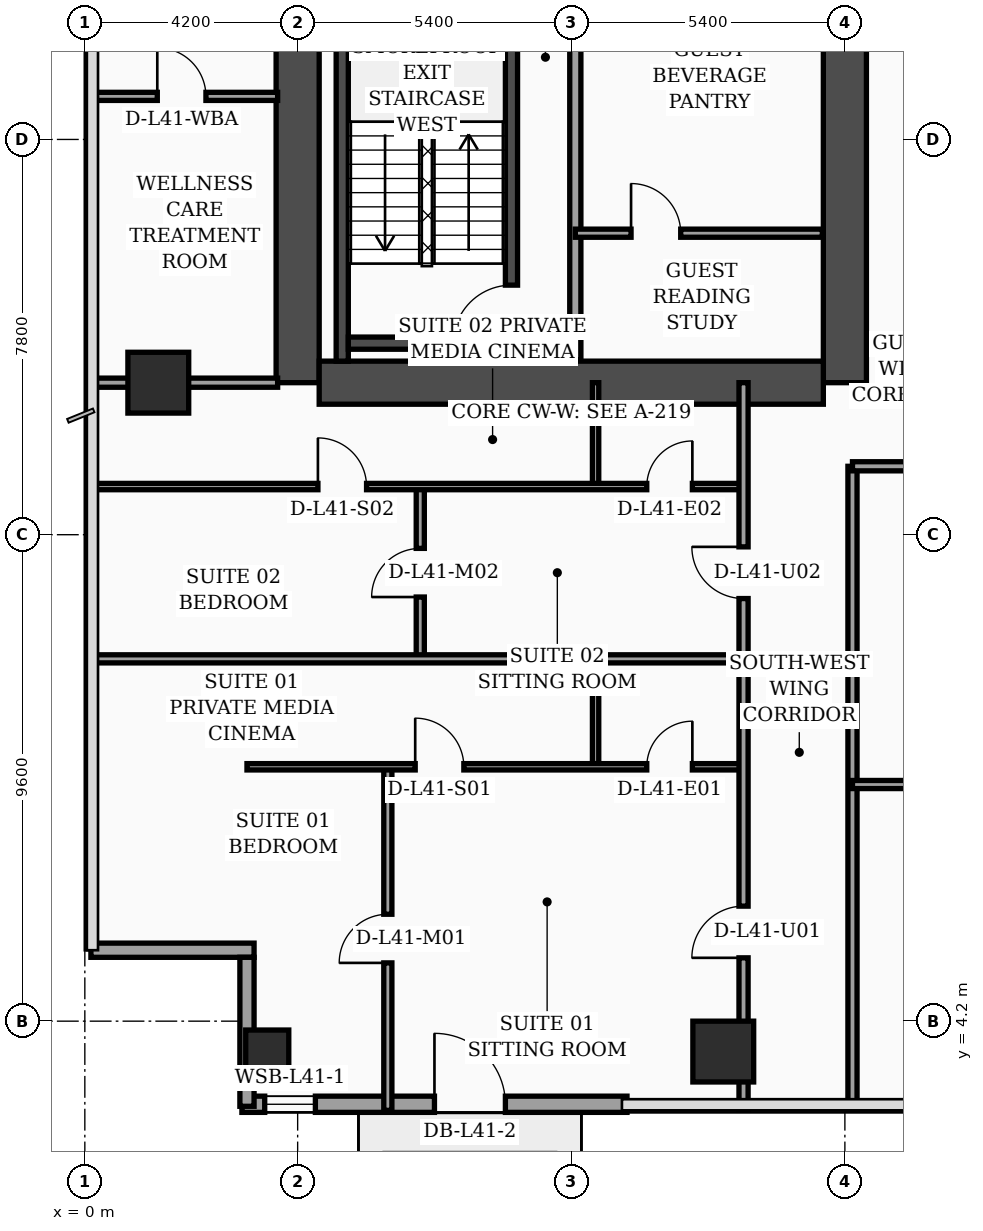
"""IFC4 building model, lengths in metres.
Left out: names, types, materials, properties, quantities, classifications, styles, units other than length and angle.
Written with IfcOpenShell. Run it as: python <this file> out.ifc"""

import sys

from ifc_helpers import new_model, si_unit, direction, frame, frame_2d, origin, origin_2d, place, context, subcontext, project, spatial, rectangle, hollow_rectangle, extrude, element, fill, save


model = new_model("IFC4")
c1 = context("Model", 3, precision=1e-05, world=origin(), true_north=direction((0.0, 1.0)))
c2 = subcontext(c1, "Body", "Model", "MODEL_VIEW")
j1 = project(units=[si_unit("LENGTHUNIT", "METRE"), si_unit("PLANEANGLEUNIT", "RADIAN")], contexts=[c1])
p1 = place(None, origin())
s1 = spatial("IfcSite", under=j1, at=p1, CompositionType="ELEMENT")
p2 = place(p1, origin())
s2 = spatial("IfcBuilding", under=s1, at=p2, CompositionType="ELEMENT")
p3 = place(p2, frame((0.0, 0.0, 167.5)))
s3 = spatial("IfcBuildingStorey", under=s2, at=p3, CompositionType="ELEMENT", Elevation=167.5)
p4 = place(p3, frame((4.2, 16.8, 0.0), z_axis=(0.0, 0.0, 1.0), x_axis=(0.0, 1.0, 0.0)))
e1 = element("IfcWall", 1, at=p4, inside=s3, PredefinedType="SHEAR", context=c2, shape_type="SweptSolid", body=[
    extrude(rectangle(XDim=21.6, YDim=0.85, at=frame_2d((10.8, 0.0))), origin(), (0.0, 0.0, 1.0), 3.56),
])
p5 = place(p3, frame((15.0, 16.8, 0.0), z_axis=(0.0, 0.0, 1.0), x_axis=(0.0, 1.0, 0.0)))
e2 = element("IfcWall", 2, at=p5, inside=s3, PredefinedType="SHEAR", context=c2, shape_type="SweptSolid", body=[
    extrude(rectangle(XDim=21.6, YDim=0.85, at=frame_2d((10.8, 0.0))), origin(), (0.0, 0.0, 1.0), 3.56),
])
p6 = place(p5, frame((8.65, 0.0, 0.0)))
e3 = element("IfcOpeningElement", 3, at=p6, cuts=e2, PredefinedType="OPENING", context=c2, shape_type="SweptSolid", body=[
    extrude(rectangle(XDim=1.1, YDim=2.2, at=frame_2d((0.55, 1.1))), frame((0.0, 0.435, 0.0), z_axis=(0.0, -1.0, 0.0), x_axis=(1.0, 0.0, 0.0)), (0.0, 0.0, 1.0), 0.87),
])
p7 = place(p5, frame((10.85, 0.0, 0.0)))
e4 = element("IfcOpeningElement", 4, at=p7, cuts=e2, PredefinedType="OPENING", context=c2, shape_type="SweptSolid", body=[
    extrude(rectangle(XDim=1.1, YDim=2.2, at=frame_2d((0.55, 1.1))), frame((0.0, 0.435, 0.0), z_axis=(0.0, -1.0, 0.0), x_axis=(1.0, 0.0, 0.0)), (0.0, 0.0, 1.0), 0.87),
])
p8 = place(p5, frame((13.5, 0.0, 0.0)))
e5 = element("IfcOpeningElement", 5, at=p8, cuts=e2, PredefinedType="OPENING", context=c2, shape_type="SweptSolid", body=[
    extrude(rectangle(XDim=1.1, YDim=2.2, at=frame_2d((0.55, 1.1))), frame((0.0, 0.435, 0.0), z_axis=(0.0, -1.0, 0.0), x_axis=(1.0, 0.0, 0.0)), (0.0, 0.0, 1.0), 0.87),
])
p9 = place(p5, frame((16.15, 0.0, 0.0)))
e6 = element("IfcOpeningElement", 6, at=p9, cuts=e2, PredefinedType="OPENING", context=c2, shape_type="SweptSolid", body=[
    extrude(rectangle(XDim=1.1, YDim=2.2, at=frame_2d((0.55, 1.1))), frame((0.0, 0.435, 0.0), z_axis=(0.0, -1.0, 0.0), x_axis=(1.0, 0.0, 0.0)), (0.0, 0.0, 1.0), 0.87),
])
p10 = place(p3, frame((4.625, 16.8, 0.0), z_axis=(0.0, 0.0, 1.0), x_axis=(1.0, 0.0, 0.0)))
e7 = element("IfcWall", 7, at=p10, inside=s3, PredefinedType="SHEAR", context=c2, shape_type="SweptSolid", body=[
    extrude(rectangle(XDim=9.95, YDim=0.85, at=frame_2d((4.975, 0.0))), origin(), (0.0, 0.0, 1.0), 3.56),
])
p11 = place(p3, frame((5.08, 17.225, 0.0), z_axis=(0.0, 0.0, 1.0), x_axis=(0.0, 1.0, 0.0)))
e8 = element("IfcWall", 8, at=p11, inside=s3, PredefinedType="SOLIDWALL", context=c2, shape_type="SweptSolid", body=[
    extrude(rectangle(XDim=9.565, YDim=0.24, at=frame_2d((4.782, 0.0))), origin(), (0.0, 0.0, 1.0), 3.56),
])
p12 = place(p3, frame((8.42, 17.225, 0.0), z_axis=(0.0, 0.0, 1.0), x_axis=(0.0, 1.0, 0.0)))
e9 = element("IfcWall", 9, at=p12, inside=s3, PredefinedType="SOLIDWALL", context=c2, shape_type="SweptSolid", body=[
    extrude(rectangle(XDim=9.565, YDim=0.24, at=frame_2d((4.782, 0.0))), origin(), (0.0, 0.0, 1.0), 3.56),
])
p13 = place(p12, frame((0.35, 0.0, 0.0)))
e10 = element("IfcOpeningElement", 10, at=p13, cuts=e9, PredefinedType="OPENING", context=c2, shape_type="SweptSolid", body=[
    extrude(rectangle(XDim=1.15, YDim=2.2, at=frame_2d((0.575, 1.1))), frame((0.0, 0.13, 0.0), z_axis=(0.0, -1.0, 0.0), x_axis=(1.0, 0.0, 0.0)), (0.0, 0.0, 1.0), 0.26),
])
p14 = place(p3, frame((5.2, 17.58, 0.0), z_axis=(0.0, 0.0, 1.0), x_axis=(1.0, 0.0, 0.0)))
e11 = element("IfcWall", 11, at=p14, inside=s3, PredefinedType="SOLIDWALL", context=c2, shape_type="SweptSolid", body=[
    extrude(rectangle(XDim=3.1, YDim=0.24, at=frame_2d((1.55, 0.0))), origin(), (0.0, 0.0, 1.0), 3.56),
])
p15 = place(p3, frame((3.6, 3.6, 0.0), z_axis=(0.0, 0.0, 1.0), x_axis=(1.0, 0.0, 0.0)))
e12 = element("IfcColumn", 12, at=p15, inside=s3, PredefinedType="COLUMN", context=c2, shape_type="SweptSolid", body=[
    extrude(hollow_rectangle(XDim=0.85, YDim=0.85, WallThickness=0.036, at=origin_2d()), origin(), (0.0, 0.0, 1.0), 3.56),
])
for number, where, z_axis, x_axis in (
    (13, (1.45, 16.8, 0.0), (0.0, 0.0, 1.0), (1.0, 0.0, 0.0)),
    (14, (12.6, 3.6, 0.0), (0.0, 0.0, 1.0), (1.0, 0.0, 0.0)),
):
    element("IfcColumn", number, at=place(p3, frame(where, z_axis=z_axis, x_axis=x_axis)), inside=s3, PredefinedType="COLUMN", context=c2, shape_type="SweptSolid", body=[
        extrude(rectangle(XDim=1.2, YDim=1.2, at=origin_2d()), origin(), (0.0, 0.0, 1.0), 3.56),
    ])
p16 = place(p3, frame((3.1, 2.56, 0.0), z_axis=(0.0, 0.0, 1.0), x_axis=(1.0, 0.0, 0.0)))
e15 = element("IfcWall", 15, at=p16, inside=s3, PredefinedType="SOLIDWALL", context=c2, shape_type="SweptSolid", body=[
    extrude(rectangle(XDim=7.6, YDim=0.32, at=frame_2d((3.8, 0.0))), origin(), (0.0, 0.0, 1.0), 3.56),
])
p17 = place(p16, frame((0.45, 0.0, 0.75)))
e16 = element("IfcOpeningElement", 16, at=p17, cuts=e15, PredefinedType="OPENING", context=c2, shape_type="SweptSolid", body=[
    extrude(rectangle(XDim=1.0, YDim=1.6, at=frame_2d((0.5, 0.8))), frame((0.0, 0.17, 0.0), z_axis=(0.0, -1.0, 0.0), x_axis=(1.0, 0.0, 0.0)), (0.0, 0.0, 1.0), 0.34),
])
p18 = place(p16, frame((3.8, 0.0, 0.0)))
e17 = element("IfcOpeningElement", 17, at=p18, cuts=e15, PredefinedType="OPENING", context=c2, shape_type="SweptSolid", body=[
    extrude(rectangle(XDim=1.4, YDim=2.25, at=frame_2d((0.7, 1.125))), frame((0.0, 0.17, 0.0), z_axis=(0.0, -1.0, 0.0), x_axis=(1.0, 0.0, 0.0)), (0.0, 0.0, 1.0), 0.34),
])
p19 = place(p3, frame((0.12, 5.6, 0.0), z_axis=(0.0, 0.0, 1.0), x_axis=(1.0, 0.0, 0.0)))
e18 = element("IfcWall", 18, at=p19, inside=s3, PredefinedType="SOLIDWALL", context=c2, shape_type="SweptSolid", body=[
    extrude(rectangle(XDim=3.22, YDim=0.28, at=frame_2d((1.61, 0.0))), origin(), (0.0, 0.0, 1.0), 2.94),
])
p20 = place(p3, frame((3.2, 5.46, 0.0), z_axis=(0.0, 0.0, 1.0), x_axis=(0.0, -1.0, 0.0)))
e19 = element("IfcWall", 19, at=p20, inside=s3, PredefinedType="SOLIDWALL", context=c2, shape_type="SweptSolid", body=[
    extrude(rectangle(XDim=2.94, YDim=0.28, at=frame_2d((1.47, 0.0))), origin(), (0.0, 0.0, 1.0), 2.94),
])
p21 = place(p3, frame((9.68, 17.245, 0.0), z_axis=(0.0, 0.0, 1.0), x_axis=(0.0, 1.0, 0.0)))
e20 = element("IfcWall", 20, at=p21, inside=s3, PredefinedType="SOLIDWALL", context=c2, shape_type="SweptSolid", body=[
    extrude(rectangle(XDim=7.755, YDim=0.22, at=frame_2d((3.877, 0.0))), origin(), (0.0, 0.0, 1.0), 3.56),
])
p22 = place(p3, frame((9.68, 19.75, 0.0), z_axis=(0.0, 0.0, 1.0), x_axis=(1.0, 0.0, 0.0)))
e21 = element("IfcWall", 21, at=p22, inside=s3, PredefinedType="PARTITIONING", context=c2, shape_type="SweptSolid", body=[
    extrude(rectangle(XDim=4.875, YDim=0.16, at=frame_2d((2.438, 0.0))), origin(), (0.0, 0.0, 1.0), 3.56),
])
p23 = place(p22, frame((1.1, 0.0, 0.0)))
e22 = element("IfcOpeningElement", 22, at=p23, cuts=e21, PredefinedType="OPENING", context=c2, shape_type="SweptSolid", body=[
    extrude(rectangle(XDim=0.98, YDim=2.15, at=frame_2d((0.49, 1.075))), frame((0.0, 0.09, 0.0), z_axis=(0.0, -1.0, 0.0), x_axis=(1.0, 0.0, 0.0)), (0.0, 0.0, 1.0), 0.18),
])
p24 = place(p3, frame((0.08, 22.45, 0.0), z_axis=(0.0, 0.0, 1.0), x_axis=(1.0, 0.0, 0.0)))
e23 = element("IfcWall", 23, at=p24, inside=s3, PredefinedType="PARTITIONING", context=c2, shape_type="SweptSolid", body=[
    extrude(rectangle(XDim=3.725, YDim=0.16, at=frame_2d((1.862, 0.0))), origin(), (0.0, 0.0, 1.0), 3.04),
])
p25 = place(p24, frame((1.35, 0.0, 0.0)))
e24 = element("IfcOpeningElement", 24, at=p25, cuts=e23, PredefinedType="OPENING", context=c2, shape_type="SweptSolid", body=[
    extrude(rectangle(XDim=0.96, YDim=2.2, at=frame_2d((0.48, 1.1))), frame((0.0, 0.09, 0.0), z_axis=(0.0, -1.0, 0.0), x_axis=(1.0, 0.0, 0.0)), (0.0, 0.0, 1.0), 0.18),
])
p26 = place(p3, frame((0.08, 16.8, 0.0), z_axis=(0.0, 0.0, 1.0), x_axis=(1.0, 0.0, 0.0)))
e25 = element("IfcWall", 25, at=p26, inside=s3, PredefinedType="PARTITIONING", context=c2, shape_type="SweptSolid", body=[
    extrude(rectangle(XDim=3.725, YDim=0.18, at=frame_2d((1.862, 0.0))), origin(), (0.0, 0.0, 1.0), 2.94),
])
p27 = place(p3, frame((10.08, 9.22, 0.0), z_axis=(0.0, 0.0, 1.0), x_axis=(0.0, 1.0, 0.0)))
e26 = element("IfcWall", 26, at=p27, inside=s3, PredefinedType="PARTITIONING", context=c2, shape_type="SweptSolid", body=[
    extrude(rectangle(XDim=2.13, YDim=0.125, at=frame_2d((1.065, 0.0))), origin(), (0.0, 0.0, 1.0), 3.09),
])
p28 = place(p3, frame((5.98, 2.44, 0.0), z_axis=(0.0, 0.0, 1.0), x_axis=(0.0, 1.0, 0.0)))
e27 = element("IfcWall", 27, at=p28, inside=s3, PredefinedType="PARTITIONING", context=c2, shape_type="SweptSolid", body=[
    extrude(rectangle(XDim=6.78, YDim=0.16, at=frame_2d((3.39, 0.0))), origin(), (0.0, 0.0, 1.0), 3.04),
])
p29 = place(p28, frame((2.91, 0.0, 0.0)))
e28 = element("IfcOpeningElement", 28, at=p29, cuts=e27, PredefinedType="OPENING", context=c2, shape_type="SweptSolid", body=[
    extrude(rectangle(XDim=0.96, YDim=2.2, at=frame_2d((0.48, 1.1))), frame((0.0, 0.09, 0.0), z_axis=(0.0, -1.0, 0.0), x_axis=(1.0, 0.0, 0.0)), (0.0, 0.0, 1.0), 0.18),
])
p30 = place(p3, frame((3.2, 9.22, 0.0), z_axis=(0.0, 0.0, 1.0), x_axis=(1.0, 0.0, 0.0)))
e29 = element("IfcWall", 29, at=p30, inside=s3, PredefinedType="PARTITIONING", context=c2, shape_type="SweptSolid", body=[
    extrude(rectangle(XDim=9.8, YDim=0.125, at=frame_2d((4.9, 0.0))), origin(), (0.0, 0.0, 1.0), 2.94),
])
p31 = place(p30, frame((3.32, 0.0, 0.0)))
e30 = element("IfcOpeningElement", 30, at=p31, cuts=e29, PredefinedType="OPENING", context=c2, shape_type="SweptSolid", body=[
    extrude(rectangle(XDim=0.96, YDim=2.2, at=frame_2d((0.48, 1.1))), frame((0.0, 0.073, 0.0), z_axis=(0.0, -1.0, 0.0), x_axis=(1.0, 0.0, 0.0)), (0.0, 0.0, 1.0), 0.145),
])
p32 = place(p30, frame((7.89, 0.0, 0.0)))
e31 = element("IfcOpeningElement", 31, at=p32, cuts=e29, PredefinedType="OPENING", context=c2, shape_type="SweptSolid", body=[
    extrude(rectangle(XDim=0.9, YDim=2.15, at=frame_2d((0.45, 1.075))), frame((0.0, 0.073, 0.0), z_axis=(0.0, -1.0, 0.0), x_axis=(1.0, 0.0, 0.0)), (0.0, 0.0, 1.0), 0.145),
])
p33 = place(p3, frame((10.08, 14.75, 0.0), z_axis=(0.0, 0.0, 1.0), x_axis=(0.0, 1.0, 0.0)))
e32 = element("IfcWall", 32, at=p33, inside=s3, PredefinedType="PARTITIONING", context=c2, shape_type="SweptSolid", body=[
    extrude(rectangle(XDim=2.05, YDim=0.125, at=frame_2d((1.025, 0.0))), origin(), (0.0, 0.0, 1.0), 3.56),
])
p34 = place(p3, frame((6.62, 11.35, 0.0), z_axis=(0.0, 0.0, 1.0), x_axis=(0.0, 1.0, 0.0)))
e33 = element("IfcWall", 33, at=p34, inside=s3, PredefinedType="PARTITIONING", context=c2, shape_type="SweptSolid", body=[
    extrude(rectangle(XDim=3.4, YDim=0.16, at=frame_2d((1.7, 0.0))), origin(), (0.0, 0.0, 1.0), 3.56),
])
p35 = place(p34, frame((1.22, 0.0, 0.0)))
e34 = element("IfcOpeningElement", 34, at=p35, cuts=e33, PredefinedType="OPENING", context=c2, shape_type="SweptSolid", body=[
    extrude(rectangle(XDim=0.96, YDim=2.2, at=frame_2d((0.48, 1.1))), frame((0.0, 0.09, 0.0), z_axis=(0.0, -1.0, 0.0), x_axis=(1.0, 0.0, 0.0)), (0.0, 0.0, 1.0), 0.18),
])
p36 = place(p3, frame((0.08, 14.75, 0.0), z_axis=(0.0, 0.0, 1.0), x_axis=(1.0, 0.0, 0.0)))
e35 = element("IfcWall", 35, at=p36, inside=s3, PredefinedType="PARTITIONING", context=c2, shape_type="SweptSolid", body=[
    extrude(rectangle(XDim=12.92, YDim=0.125, at=frame_2d((6.46, 0.0))), origin(), (0.0, 0.0, 1.0), 2.94),
])
p37 = place(p36, frame((4.52, 0.0, 0.0)))
e36 = element("IfcOpeningElement", 36, at=p37, cuts=e35, PredefinedType="OPENING", context=c2, shape_type="SweptSolid", body=[
    extrude(rectangle(XDim=0.96, YDim=2.2, at=frame_2d((0.48, 1.1))), frame((0.0, 0.073, 0.0), z_axis=(0.0, -1.0, 0.0), x_axis=(1.0, 0.0, 0.0)), (0.0, 0.0, 1.0), 0.145),
])
p38 = place(p36, frame((11.01, 0.0, 0.0)))
e37 = element("IfcOpeningElement", 37, at=p38, cuts=e35, PredefinedType="OPENING", context=c2, shape_type="SweptSolid", body=[
    extrude(rectangle(XDim=0.9, YDim=2.15, at=frame_2d((0.45, 1.075))), frame((0.0, 0.073, 0.0), z_axis=(0.0, -1.0, 0.0), x_axis=(1.0, 0.0, 0.0)), (0.0, 0.0, 1.0), 0.145),
])
p39 = place(p3, frame((0.08, 11.35, 0.0), z_axis=(0.0, 0.0, 1.0), x_axis=(1.0, 0.0, 0.0)))
e38 = element("IfcWall", 38, at=p39, inside=s3, PredefinedType="PARTITIONING", context=c2, shape_type="SweptSolid", body=[
    extrude(rectangle(XDim=12.92, YDim=0.16, at=frame_2d((6.46, 0.0))), origin(), (0.0, 0.0, 1.0), 2.94),
])
p40 = place(p3, frame((13.0, 2.44, 0.0), z_axis=(0.0, 0.0, 1.0), x_axis=(0.0, 1.0, 0.0)))
e39 = element("IfcWall", 39, at=p40, inside=s3, PredefinedType="PARTITIONING", context=c2, shape_type="SweptSolid", body=[
    extrude(rectangle(XDim=14.36, YDim=0.18, at=frame_2d((7.18, 0.0))), origin(), (0.0, 0.0, 1.0), 2.94),
])
p41 = place(p40, frame((3.01, 0.0, 0.0)))
e40 = element("IfcOpeningElement", 40, at=p41, cuts=e39, PredefinedType="OPENING", context=c2, shape_type="SweptSolid", body=[
    extrude(rectangle(XDim=1.02, YDim=2.2, at=frame_2d((0.51, 1.1))), frame((0.0, 0.1, 0.0), z_axis=(0.0, -1.0, 0.0), x_axis=(1.0, 0.0, 0.0)), (0.0, 0.0, 1.0), 0.2),
])
p42 = place(p40, frame((10.1, 0.0, 0.0)))
e41 = element("IfcOpeningElement", 41, at=p42, cuts=e39, PredefinedType="OPENING", context=c2, shape_type="SweptSolid", body=[
    extrude(rectangle(XDim=1.02, YDim=2.2, at=frame_2d((0.51, 1.1))), frame((0.0, 0.1, 0.0), z_axis=(0.0, -1.0, 0.0), x_axis=(1.0, 0.0, 0.0)), (0.0, 0.0, 1.0), 0.2),
])
p43 = place(p3, frame((15.15, 2.44, 0.0), z_axis=(0.0, 0.0, 1.0), x_axis=(0.0, 1.0, 0.0)))
e42 = element("IfcWall", 42, at=p43, inside=s3, PredefinedType="PARTITIONING", context=c2, shape_type="SweptSolid", body=[
    extrude(rectangle(XDim=12.71, YDim=0.18, at=frame_2d((6.355, 0.0))), origin(), (0.0, 0.0, 1.0), 3.04),
])
p44 = place(p3, frame((15.15, 8.87, 0.0), z_axis=(0.0, 0.0, 1.0), x_axis=(1.0, 0.0, 0.0)))
e43 = element("IfcWall", 43, at=p44, inside=s3, PredefinedType="PARTITIONING", context=c2, shape_type="SweptSolid", body=[
    extrude(rectangle(XDim=4.45, YDim=0.16, at=frame_2d((2.225, 0.0))), origin(), (0.0, 0.0, 1.0), 3.56),
])
p45 = place(p44, frame((1.75, 0.0, 0.0)))
e44 = element("IfcOpeningElement", 44, at=p45, cuts=e43, PredefinedType="OPENING", context=c2, shape_type="SweptSolid", body=[
    extrude(rectangle(XDim=0.96, YDim=2.2, at=frame_2d((0.48, 1.1))), frame((0.0, 0.09, 0.0), z_axis=(0.0, -1.0, 0.0), x_axis=(1.0, 0.0, 0.0)), (0.0, 0.0, 1.0), 0.18),
])
p46 = place(p3, frame((15.15, 15.15, 0.0), z_axis=(0.0, 0.0, 1.0), x_axis=(1.0, 0.0, 0.0)))
e45 = element("IfcWall", 45, at=p46, inside=s3, PredefinedType="PARTITIONING", context=c2, shape_type="SweptSolid", body=[
    extrude(rectangle(XDim=6.45, YDim=0.18, at=frame_2d((3.225, 0.0))), origin(), (0.0, 0.0, 1.0), 2.49),
])
p47 = place(p46, frame((1.74, 0.0, 0.0)))
e46 = element("IfcOpeningElement", 46, at=p47, cuts=e45, PredefinedType="OPENING", context=c2, shape_type="SweptSolid", body=[
    extrude(rectangle(XDim=1.02, YDim=2.2, at=frame_2d((0.51, 1.1))), frame((0.0, 0.1, 0.0), z_axis=(0.0, -1.0, 0.0), x_axis=(1.0, 0.0, 0.0)), (0.0, 0.0, 1.0), 0.2),
])
p48 = place(p17, origin())
e47 = element("IfcWindow", 47, at=p48, inside=s3, PartitioningType="SINGLE_PANEL", PredefinedType="WINDOW", context=c2, shape_type="SweptSolid", body=[
    extrude(rectangle(XDim=1.0, YDim=1.6, at=frame_2d((0.5, 0.8))), frame((0.0, 0.03, 0.0), z_axis=(0.0, -1.0, 0.0), x_axis=(1.0, 0.0, 0.0)), (0.0, 0.0, 1.0), 0.06),
])
fill(e16, e47)
p49 = place(p18, origin())
e48 = element("IfcDoor", 48, at=p49, inside=s3, OperationType="SINGLE_SWING_LEFT", PredefinedType="DOOR", context=c2, shape_type="SweptSolid", body=[
    extrude(rectangle(XDim=1.4, YDim=2.25, at=frame_2d((0.7, 1.125))), frame((0.0, 0.025, 0.0), z_axis=(0.0, -1.0, 0.0), x_axis=(1.0, 0.0, 0.0)), (0.0, 0.0, 1.0), 0.05),
])
fill(e17, e48)
p50 = place(p23, origin())
e49 = element("IfcDoor", 49, at=p50, inside=s3, OperationType="SINGLE_SWING_LEFT", PredefinedType="DOOR", context=c2, shape_type="SweptSolid", body=[
    extrude(rectangle(XDim=0.98, YDim=2.15, at=frame_2d((0.49, 1.075))), frame((0.0, 0.025, 0.0), z_axis=(0.0, -1.0, 0.0), x_axis=(1.0, 0.0, 0.0)), (0.0, 0.0, 1.0), 0.05),
])
fill(e22, e49)
p51 = place(p25, origin())
e50 = element("IfcDoor", 50, at=p51, inside=s3, OperationType="SINGLE_SWING_LEFT", PredefinedType="DOOR", context=c2, shape_type="SweptSolid", body=[
    extrude(rectangle(XDim=0.96, YDim=2.2, at=frame_2d((0.48, 1.1))), frame((0.0, 0.025, 0.0), z_axis=(0.0, -1.0, 0.0), x_axis=(1.0, 0.0, 0.0)), (0.0, 0.0, 1.0), 0.05),
])
fill(e24, e50)
p52 = place(p29, origin())
e51 = element("IfcDoor", 51, at=p52, inside=s3, OperationType="SINGLE_SWING_LEFT", PredefinedType="DOOR", context=c2, shape_type="SweptSolid", body=[
    extrude(rectangle(XDim=0.96, YDim=2.2, at=frame_2d((0.48, 1.1))), frame((0.0, 0.025, 0.0), z_axis=(0.0, -1.0, 0.0), x_axis=(1.0, 0.0, 0.0)), (0.0, 0.0, 1.0), 0.05),
])
fill(e28, e51)
p53 = place(p31, origin())
e52 = element("IfcDoor", 52, at=p53, inside=s3, OperationType="SINGLE_SWING_LEFT", PredefinedType="DOOR", context=c2, shape_type="SweptSolid", body=[
    extrude(rectangle(XDim=0.96, YDim=2.2, at=frame_2d((0.48, 1.1))), frame((0.0, 0.025, 0.0), z_axis=(0.0, -1.0, 0.0), x_axis=(1.0, 0.0, 0.0)), (0.0, 0.0, 1.0), 0.05),
])
fill(e30, e52)
p54 = place(p32, origin())
e53 = element("IfcDoor", 53, at=p54, inside=s3, OperationType="SINGLE_SWING_RIGHT", PredefinedType="DOOR", context=c2, shape_type="SweptSolid", body=[
    extrude(rectangle(XDim=0.9, YDim=2.15, at=frame_2d((0.45, 1.075))), frame((0.0, 0.025, 0.0), z_axis=(0.0, -1.0, 0.0), x_axis=(1.0, 0.0, 0.0)), (0.0, 0.0, 1.0), 0.05),
])
fill(e31, e53)
p55 = place(p35, origin())
e54 = element("IfcDoor", 54, at=p55, inside=s3, OperationType="SINGLE_SWING_LEFT", PredefinedType="DOOR", context=c2, shape_type="SweptSolid", body=[
    extrude(rectangle(XDim=0.96, YDim=2.2, at=frame_2d((0.48, 1.1))), frame((0.0, 0.025, 0.0), z_axis=(0.0, -1.0, 0.0), x_axis=(1.0, 0.0, 0.0)), (0.0, 0.0, 1.0), 0.05),
])
fill(e34, e54)
p56 = place(p37, origin())
e55 = element("IfcDoor", 55, at=p56, inside=s3, OperationType="SINGLE_SWING_LEFT", PredefinedType="DOOR", context=c2, shape_type="SweptSolid", body=[
    extrude(rectangle(XDim=0.96, YDim=2.2, at=frame_2d((0.48, 1.1))), frame((0.0, 0.025, 0.0), z_axis=(0.0, -1.0, 0.0), x_axis=(1.0, 0.0, 0.0)), (0.0, 0.0, 1.0), 0.05),
])
fill(e36, e55)
p57 = place(p38, origin())
e56 = element("IfcDoor", 56, at=p57, inside=s3, OperationType="SINGLE_SWING_RIGHT", PredefinedType="DOOR", context=c2, shape_type="SweptSolid", body=[
    extrude(rectangle(XDim=0.9, YDim=2.15, at=frame_2d((0.45, 1.075))), frame((0.0, 0.025, 0.0), z_axis=(0.0, -1.0, 0.0), x_axis=(1.0, 0.0, 0.0)), (0.0, 0.0, 1.0), 0.05),
])
fill(e37, e56)
p58 = place(p41, origin())
e57 = element("IfcDoor", 57, at=p58, inside=s3, OperationType="SINGLE_SWING_LEFT", PredefinedType="DOOR", context=c2, shape_type="SweptSolid", body=[
    extrude(rectangle(XDim=1.02, YDim=2.2, at=frame_2d((0.51, 1.1))), frame((0.0, 0.025, 0.0), z_axis=(0.0, -1.0, 0.0), x_axis=(1.0, 0.0, 0.0)), (0.0, 0.0, 1.0), 0.05),
])
fill(e40, e57)
p59 = place(p42, origin())
e58 = element("IfcDoor", 58, at=p59, inside=s3, OperationType="SINGLE_SWING_RIGHT", PredefinedType="DOOR", context=c2, shape_type="SweptSolid", body=[
    extrude(rectangle(XDim=1.02, YDim=2.2, at=frame_2d((0.51, 1.1))), frame((0.0, 0.025, 0.0), z_axis=(0.0, -1.0, 0.0), x_axis=(1.0, 0.0, 0.0)), (0.0, 0.0, 1.0), 0.05),
])
fill(e41, e58)
p60 = place(p13, origin())
e59 = element("IfcDoor", 59, at=p60, inside=s3, OperationType="SINGLE_SWING_LEFT", PredefinedType="DOOR", context=c2, shape_type="SweptSolid", body=[
    extrude(rectangle(XDim=1.15, YDim=2.2, at=frame_2d((0.575, 1.1))), frame((0.0, 0.025, 0.0), z_axis=(0.0, -1.0, 0.0), x_axis=(1.0, 0.0, 0.0)), (0.0, 0.0, 1.0), 0.05),
])
fill(e10, e59)
save(model, sys.argv[1])
